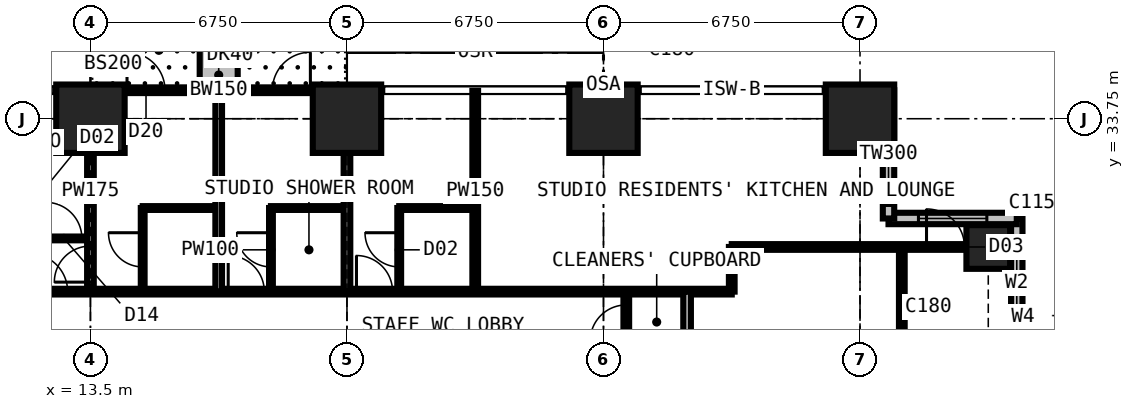
"""IFC4 building model, lengths in metres.
Left out: names, types, materials, properties, quantities, classifications, styles, units other than length and angle.
Written with IfcOpenShell. Run it as: python <this file> out.ifc"""

import sys

from ifc_helpers import new_model, si_unit, direction, frame, frame_2d, origin, origin_2d, place, context, subcontext, project, spatial, rectangle, extrude, element, fill, save


model = new_model("IFC4")
c1 = context("Model", 3, precision=1e-05, world=origin(), true_north=direction((0.0, 1.0)))
c2 = subcontext(c1, "Body", "Model", "MODEL_VIEW")
j1 = project(units=[si_unit("LENGTHUNIT", "METRE"), si_unit("PLANEANGLEUNIT", "RADIAN")], contexts=[c1])
p1 = place(None, origin())
s1 = spatial("IfcSite", under=j1, at=p1, CompositionType="ELEMENT")
p2 = place(p1, origin())
s2 = spatial("IfcBuilding", under=s1, at=p2, CompositionType="ELEMENT")
p3 = place(p2, frame((0.0, 0.0, 101.7)))
s3 = spatial("IfcBuildingStorey", under=s2, at=p3, CompositionType="ELEMENT", Elevation=101.7)
for number, where, z_axis, x_axis in (
    (1, (13.5, 33.75, 0.0), (0.0, 0.0, 1.0), (1.0, 0.0, 0.0)),
    (2, (20.25, 33.75, 0.0), (0.0, 0.0, 1.0), (1.0, 0.0, 0.0)),
    (3, (27.0, 33.75, 0.0), (0.0, 0.0, 1.0), (1.0, 0.0, 0.0)),
    (4, (33.75, 33.75, 0.0), (0.0, 0.0, 1.0), (1.0, 0.0, 0.0)),
):
    element("IfcColumn", number, at=place(p3, frame(where, z_axis=z_axis, x_axis=x_axis)), inside=s3, PredefinedType="COLUMN", context=c2, shape_type="SweptSolid", body=[
        extrude(rectangle(XDim=1.8, YDim=1.8, at=origin_2d()), origin(), (0.0, 0.0, 1.0), 3.6),
    ])
p4 = place(p3, frame((37.125, 30.375, 0.0), z_axis=(0.0, 0.0, 1.0), x_axis=(1.0, 0.0, 0.0)))
e5 = element("IfcColumn", 5, at=p4, inside=s3, PredefinedType="COLUMN", context=c2, shape_type="SweptSolid", body=[
    extrude(rectangle(XDim=1.15, YDim=1.15, at=origin_2d()), origin(), (0.0, 0.0, 1.0), 3.6),
])
p5 = place(p3, frame((37.875, 27.75, 0.0), z_axis=(0.0, 0.0, 1.0), x_axis=(0.0, 1.0, 0.0)))
e6 = element("IfcWall", 6, at=p5, inside=s3, PredefinedType="SOLIDWALL", context=c2, shape_type="SweptSolid", body=[
    extrude(rectangle(XDim=3.375, YDim=0.3, at=frame_2d((1.688, 0.0))), origin(), (0.0, 0.0, 1.0), 3.375),
])
p6 = place(p5, frame((0.788, 0.0, 0.6)))
e7 = element("IfcOpeningElement", 7, at=p6, cuts=e6, PredefinedType="OPENING", context=c2, shape_type="SweptSolid", body=[
    extrude(rectangle(XDim=1.8, YDim=2.1, at=frame_2d((0.9, 1.05))), frame((0.0, 0.16, 0.0), z_axis=(0.0, -1.0, 0.0), x_axis=(1.0, 0.0, 0.0)), (0.0, 0.0, 1.0), 0.32),
])
p7 = place(p3, frame((37.875, 31.125, 0.0), z_axis=(0.0, 0.0, 1.0), x_axis=(-1.0, 0.0, 0.0)))
e8 = element("IfcWall", 8, at=p7, inside=s3, PredefinedType="SOLIDWALL", context=c2, shape_type="SweptSolid", body=[
    extrude(rectangle(XDim=3.375, YDim=0.3, at=frame_2d((1.688, 0.0))), origin(), (0.0, 0.0, 1.0), 3.375),
])
p8 = place(p7, frame((0.788, 0.0, 0.6)))
e9 = element("IfcOpeningElement", 9, at=p8, cuts=e8, PredefinedType="OPENING", context=c2, shape_type="SweptSolid", body=[
    extrude(rectangle(XDim=1.8, YDim=2.1, at=frame_2d((0.9, 1.05))), frame((0.0, 0.16, 0.0), z_axis=(0.0, -1.0, 0.0), x_axis=(1.0, 0.0, 0.0)), (0.0, 0.0, 1.0), 0.32),
])
p9 = place(p3, frame((34.5, 31.125, 0.0), z_axis=(0.0, 0.0, 1.0), x_axis=(0.0, 1.0, 0.0)))
e10 = element("IfcWall", 10, at=p9, inside=s3, PredefinedType="SOLIDWALL", context=c2, shape_type="SweptSolid", body=[
    extrude(rectangle(XDim=3.375, YDim=0.3, at=frame_2d((1.688, 0.0))), origin(), (0.0, 0.0, 1.0), 3.375),
])
p10 = place(p9, frame((0.343, 0.0, 0.9)))
e11 = element("IfcOpeningElement", 11, at=p10, cuts=e10, PredefinedType="OPENING", context=c2, shape_type="SweptSolid", body=[
    extrude(rectangle(XDim=1.2, YDim=1.8, at=frame_2d((0.6, 0.9))), frame((0.0, 0.16, 0.0), z_axis=(0.0, -1.0, 0.0), x_axis=(1.0, 0.0, 0.0)), (0.0, 0.0, 1.0), 0.32),
])
p11 = place(p3, frame((13.5, 34.5, 0.0), z_axis=(0.0, 0.0, 1.0), x_axis=(1.0, 0.0, 0.0)))
e12 = element("IfcWall", 12, at=p11, inside=s3, PredefinedType="SOLIDWALL", context=c2, shape_type="SweptSolid", body=[
    extrude(rectangle(XDim=6.75, YDim=0.15, at=frame_2d((3.375, 0.0))), origin(), (0.0, 0.0, 1.0), 3.375),
])
p12 = place(p11, frame((0.962, 0.0, 0.0)))
e13 = element("IfcOpeningElement", 13, at=p12, cuts=e12, PredefinedType="OPENING", context=c2, shape_type="SweptSolid", body=[
    extrude(rectangle(XDim=1.0, YDim=2.2, at=frame_2d((0.5, 1.1))), frame((0.0, 0.085, 0.0), z_axis=(0.0, -1.0, 0.0), x_axis=(1.0, 0.0, 0.0)), (0.0, 0.0, 1.0), 0.17),
])
p13 = place(p11, frame((2.025, 0.0, 0.9)))
e14 = element("IfcOpeningElement", 14, at=p13, cuts=e12, PredefinedType="OPENING", context=c2, shape_type="SweptSolid", body=[
    extrude(rectangle(XDim=1.2, YDim=1.8, at=frame_2d((0.6, 0.9))), frame((0.0, 0.085, 0.0), z_axis=(0.0, -1.0, 0.0), x_axis=(1.0, 0.0, 0.0)), (0.0, 0.0, 1.0), 0.17),
])
p14 = place(p11, frame((4.788, 0.0, 0.0)))
e15 = element("IfcOpeningElement", 15, at=p14, cuts=e12, PredefinedType="OPENING", context=c2, shape_type="SweptSolid", body=[
    extrude(rectangle(XDim=1.0, YDim=2.2, at=frame_2d((0.5, 1.1))), frame((0.0, 0.085, 0.0), z_axis=(0.0, -1.0, 0.0), x_axis=(1.0, 0.0, 0.0)), (0.0, 0.0, 1.0), 0.17),
])
p15 = place(p11, frame((3.525, 0.0, 0.9)))
e16 = element("IfcOpeningElement", 16, at=p15, cuts=e12, PredefinedType="OPENING", context=c2, shape_type="SweptSolid", body=[
    extrude(rectangle(XDim=1.2, YDim=1.8, at=frame_2d((0.6, 0.9))), frame((0.0, 0.085, 0.0), z_axis=(0.0, -1.0, 0.0), x_axis=(1.0, 0.0, 0.0)), (0.0, 0.0, 1.0), 0.17),
])
p16 = place(p3, frame((16.875, 34.6, 0.0), z_axis=(0.0, 0.0, 1.0), x_axis=(0.0, 1.0, 0.0)))
e17 = element("IfcWall", 17, at=p16, inside=s3, PredefinedType="USERDEFINED", context=c2, shape_type="SweptSolid", body=[
    extrude(rectangle(XDim=2.2, YDim=1.0, at=frame_2d((1.1, 0.0))), origin(), (0.0, 0.0, 1.0), 0.9),
])
p17 = place(p3, frame((10.125, 30.6, 0.0), z_axis=(0.0, 0.0, 1.0), x_axis=(1.0, 0.0, 0.0)))
e18 = element("IfcWall", 18, at=p17, inside=s3, PredefinedType="PARTITIONING", context=c2, shape_type="SweptSolid", body=[
    extrude(rectangle(XDim=3.375, YDim=0.1, at=frame_2d((1.688, 0.0))), origin(), (0.0, 0.0, 1.0), 3.375),
])
p18 = place(p17, frame((2.2, 0.0, 0.0)))
e19 = element("IfcOpeningElement", 19, at=p18, cuts=e18, PredefinedType="OPENING", context=c2, shape_type="SweptSolid", body=[
    extrude(rectangle(XDim=0.95, YDim=2.2, at=frame_2d((0.475, 1.1))), frame((0.0, 0.06, 0.0), z_axis=(0.0, -1.0, 0.0), x_axis=(1.0, 0.0, 0.0)), (0.0, 0.0, 1.0), 0.12),
])
p19 = place(p3, frame((11.3, 29.2, 0.0), z_axis=(0.0, 0.0, 1.0), x_axis=(1.0, 0.0, 0.0)))
e20 = element("IfcWall", 20, at=p19, inside=s3, PredefinedType="PARTITIONING", context=c2, shape_type="SweptSolid", body=[
    extrude(rectangle(XDim=19.075, YDim=0.15, at=frame_2d((9.538, 0.0))), origin(), (0.0, 0.0, 1.0), 3.375),
])
p20 = place(p19, frame((5.825, 0.0, 0.0)))
e21 = element("IfcOpeningElement", 21, at=p20, cuts=e20, PredefinedType="OPENING", context=c2, shape_type="SweptSolid", body=[
    extrude(rectangle(XDim=0.95, YDim=2.2, at=frame_2d((0.475, 1.1))), frame((0.0, 0.085, 0.0), z_axis=(0.0, -1.0, 0.0), x_axis=(1.0, 0.0, 0.0)), (0.0, 0.0, 1.0), 0.17),
])
p21 = place(p19, frame((9.2, 0.0, 0.0)))
e22 = element("IfcOpeningElement", 22, at=p21, cuts=e20, PredefinedType="OPENING", context=c2, shape_type="SweptSolid", body=[
    extrude(rectangle(XDim=0.95, YDim=2.2, at=frame_2d((0.475, 1.1))), frame((0.0, 0.085, 0.0), z_axis=(0.0, -1.0, 0.0), x_axis=(1.0, 0.0, 0.0)), (0.0, 0.0, 1.0), 0.17),
])
p22 = place(p19, frame((0.6, 0.0, 0.0)))
e23 = element("IfcOpeningElement", 23, at=p22, cuts=e20, PredefinedType="OPENING", context=c2, shape_type="SweptSolid", body=[
    extrude(rectangle(XDim=1.0, YDim=2.2, at=frame_2d((0.5, 1.1))), frame((0.0, 0.085, 0.0), z_axis=(0.0, -1.0, 0.0), x_axis=(1.0, 0.0, 0.0)), (0.0, 0.0, 1.0), 0.17),
])
p23 = place(p3, frame((13.5, 29.2, 0.0), z_axis=(0.0, 0.0, 1.0), x_axis=(0.0, 1.0, 0.0)))
e24 = element("IfcWall", 24, at=p23, inside=s3, PredefinedType="PARTITIONING", context=c2, shape_type="SweptSolid", body=[
    extrude(rectangle(XDim=5.284, YDim=0.175, at=frame_2d((2.642, 0.0))), origin(), (0.0, 0.0, 1.0), 2.806),
])
p24 = place(p23, frame((0.25, 0.0, 0.0)))
e25 = element("IfcOpeningElement", 25, at=p24, cuts=e24, PredefinedType="OPENING", context=c2, shape_type="SweptSolid", body=[
    extrude(rectangle(XDim=0.95, YDim=2.2, at=frame_2d((0.475, 1.1))), frame((0.0, 0.097, 0.0), z_axis=(0.0, -1.0, 0.0), x_axis=(1.0, 0.0, 0.0)), (0.0, 0.0, 1.0), 0.195),
])
p25 = place(p3, frame((14.875, 29.2, 0.0), z_axis=(0.0, 0.0, 1.0), x_axis=(0.0, 1.0, 0.0)))
e26 = element("IfcWall", 26, at=p25, inside=s3, PredefinedType="PARTITIONING", context=c2, shape_type="SweptSolid", body=[
    extrude(rectangle(XDim=2.2, YDim=0.1, at=frame_2d((1.1, 0.0))), origin(), (0.0, 0.0, 1.0), 3.375),
])
p26 = place(p25, frame((0.65, 0.0, 0.0)))
e27 = element("IfcOpeningElement", 27, at=p26, cuts=e26, PredefinedType="OPENING", context=c2, shape_type="SweptSolid", body=[
    extrude(rectangle(XDim=0.9, YDim=2.2, at=frame_2d((0.45, 1.1))), frame((0.0, 0.06, 0.0), z_axis=(0.0, -1.0, 0.0), x_axis=(1.0, 0.0, 0.0)), (0.0, 0.0, 1.0), 0.12),
])
p27 = place(p3, frame((14.875, 31.4, 0.0), z_axis=(0.0, 0.0, 1.0), x_axis=(1.0, 0.0, 0.0)))
e28 = element("IfcWall", 28, at=p27, inside=s3, PredefinedType="PARTITIONING", context=c2, shape_type="SweptSolid", body=[
    extrude(rectangle(XDim=2.0, YDim=0.1, at=frame_2d((1.0, 0.0))), origin(), (0.0, 0.0, 1.0), 3.375),
])
p28 = place(p3, frame((16.875, 29.2, 0.0), z_axis=(0.0, 0.0, 1.0), x_axis=(0.0, 1.0, 0.0)))
e29 = element("IfcWall", 29, at=p28, inside=s3, PredefinedType="PARTITIONING", context=c2, shape_type="SweptSolid", body=[
    extrude(rectangle(XDim=5.284, YDim=0.175, at=frame_2d((2.642, 0.0))), origin(), (0.0, 0.0, 1.0), 3.375),
])
p29 = place(p3, frame((18.25, 29.2, 0.0), z_axis=(0.0, 0.0, 1.0), x_axis=(0.0, 1.0, 0.0)))
e30 = element("IfcWall", 30, at=p29, inside=s3, PredefinedType="PARTITIONING", context=c2, shape_type="SweptSolid", body=[
    extrude(rectangle(XDim=2.2, YDim=0.1, at=frame_2d((1.1, 0.0))), origin(), (0.0, 0.0, 1.0), 3.375),
])
p30 = place(p29, frame((0.65, 0.0, 0.0)))
e31 = element("IfcOpeningElement", 31, at=p30, cuts=e30, PredefinedType="OPENING", context=c2, shape_type="SweptSolid", body=[
    extrude(rectangle(XDim=0.9, YDim=2.2, at=frame_2d((0.45, 1.1))), frame((0.0, 0.06, 0.0), z_axis=(0.0, -1.0, 0.0), x_axis=(1.0, 0.0, 0.0)), (0.0, 0.0, 1.0), 0.12),
])
p31 = place(p3, frame((18.25, 31.4, 0.0), z_axis=(0.0, 0.0, 1.0), x_axis=(1.0, 0.0, 0.0)))
e32 = element("IfcWall", 32, at=p31, inside=s3, PredefinedType="PARTITIONING", context=c2, shape_type="SweptSolid", body=[
    extrude(rectangle(XDim=2.0, YDim=0.1, at=frame_2d((1.0, 0.0))), origin(), (0.0, 0.0, 1.0), 3.375),
])
p32 = place(p3, frame((20.25, 29.2, 0.0), z_axis=(0.0, 0.0, 1.0), x_axis=(0.0, 1.0, 0.0)))
e33 = element("IfcWall", 33, at=p32, inside=s3, PredefinedType="PARTITIONING", context=c2, shape_type="SweptSolid", body=[
    extrude(rectangle(XDim=5.284, YDim=0.175, at=frame_2d((2.642, 0.0))), origin(), (0.0, 0.0, 1.0), 2.61),
])
p33 = place(p3, frame((21.625, 29.2, 0.0), z_axis=(0.0, 0.0, 1.0), x_axis=(0.0, 1.0, 0.0)))
e34 = element("IfcWall", 34, at=p33, inside=s3, PredefinedType="PARTITIONING", context=c2, shape_type="SweptSolid", body=[
    extrude(rectangle(XDim=2.2, YDim=0.1, at=frame_2d((1.1, 0.0))), origin(), (0.0, 0.0, 1.0), 3.375),
])
p34 = place(p33, frame((0.65, 0.0, 0.0)))
e35 = element("IfcOpeningElement", 35, at=p34, cuts=e34, PredefinedType="OPENING", context=c2, shape_type="SweptSolid", body=[
    extrude(rectangle(XDim=0.9, YDim=2.2, at=frame_2d((0.45, 1.1))), frame((0.0, 0.06, 0.0), z_axis=(0.0, -1.0, 0.0), x_axis=(1.0, 0.0, 0.0)), (0.0, 0.0, 1.0), 0.12),
])
p35 = place(p3, frame((21.625, 31.4, 0.0), z_axis=(0.0, 0.0, 1.0), x_axis=(1.0, 0.0, 0.0)))
e36 = element("IfcWall", 36, at=p35, inside=s3, PredefinedType="PARTITIONING", context=c2, shape_type="SweptSolid", body=[
    extrude(rectangle(XDim=2.0, YDim=0.1, at=frame_2d((1.0, 0.0))), origin(), (0.0, 0.0, 1.0), 3.375),
])
p36 = place(p3, frame((23.625, 29.2, 0.0), z_axis=(0.0, 0.0, 1.0), x_axis=(0.0, 1.0, 0.0)))
e37 = element("IfcWall", 37, at=p36, inside=s3, PredefinedType="PARTITIONING", context=c2, shape_type="SweptSolid", body=[
    extrude(rectangle(XDim=5.284, YDim=0.15, at=frame_2d((2.642, 0.0))), origin(), (0.0, 0.0, 1.0), 3.375),
])
p37 = place(p3, frame((27.6, 27.6, 0.0), z_axis=(0.0, 0.0, 1.0), x_axis=(0.0, 1.0, 0.0)))
e38 = element("IfcWall", 38, at=p37, inside=s3, PredefinedType="PARTITIONING", context=c2, shape_type="SweptSolid", body=[
    extrude(rectangle(XDim=1.6, YDim=0.15, at=frame_2d((0.8, 0.0))), origin(), (0.0, 0.0, 1.0), 3.375),
])
p38 = place(p37, frame((0.3, 0.0, 0.0)))
e39 = element("IfcOpeningElement", 39, at=p38, cuts=e38, PredefinedType="OPENING", context=c2, shape_type="SweptSolid", body=[
    extrude(rectangle(XDim=0.95, YDim=2.2, at=frame_2d((0.475, 1.1))), frame((0.0, 0.085, 0.0), z_axis=(0.0, -1.0, 0.0), x_axis=(1.0, 0.0, 0.0)), (0.0, 0.0, 1.0), 0.17),
])
p39 = place(p3, frame((29.2, 11.3, 0.0), z_axis=(0.0, 0.0, 1.0), x_axis=(0.0, 1.0, 0.0)))
e40 = element("IfcWall", 40, at=p39, inside=s3, PredefinedType="PARTITIONING", context=c2, shape_type="SweptSolid", body=[
    extrude(rectangle(XDim=17.9, YDim=0.2, at=frame_2d((8.95, 0.0))), origin(), (0.0, 0.0, 1.0), 3.375),
])
p40 = place(p39, frame((8.35, 0.0, 0.0)))
e41 = element("IfcOpeningElement", 41, at=p40, cuts=e40, PredefinedType="OPENING", context=c2, shape_type="SweptSolid", body=[
    extrude(rectangle(XDim=1.2, YDim=2.2, at=frame_2d((0.6, 1.1))), frame((0.0, 0.11, 0.0), z_axis=(0.0, -1.0, 0.0), x_axis=(1.0, 0.0, 0.0)), (0.0, 0.0, 1.0), 0.22),
])
p41 = place(p3, frame((30.375, 29.2, 0.0), z_axis=(0.0, 0.0, 1.0), x_axis=(0.0, 1.0, 0.0)))
e42 = element("IfcWall", 42, at=p41, inside=s3, PredefinedType="PARTITIONING", context=c2, shape_type="SweptSolid", body=[
    extrude(rectangle(XDim=1.175, YDim=0.15, at=frame_2d((0.587, 0.0))), origin(), (0.0, 0.0, 1.0), 3.375),
])
p42 = place(p3, frame((30.375, 30.375, 0.0), z_axis=(0.0, 0.0, 1.0), x_axis=(1.0, 0.0, 0.0)))
e43 = element("IfcWall", 43, at=p42, inside=s3, PredefinedType="PARTITIONING", context=c2, shape_type="SweptSolid", body=[
    extrude(rectangle(XDim=7.35, YDim=0.15, at=frame_2d((3.675, 0.0))), origin(), (0.0, 0.0, 1.0), 2.877),
])
p43 = place(p42, frame((5.125, 0.0, 0.0)))
e44 = element("IfcOpeningElement", 44, at=p43, cuts=e43, PredefinedType="OPENING", context=c2, shape_type="SweptSolid", body=[
    extrude(rectangle(XDim=1.0, YDim=2.2, at=frame_2d((0.5, 1.1))), frame((0.0, 0.085, 0.0), z_axis=(0.0, -1.0, 0.0), x_axis=(1.0, 0.0, 0.0)), (0.0, 0.0, 1.0), 0.17),
])
p44 = place(p3, frame((34.85, 12.55, 0.0), z_axis=(0.0, 0.0, 1.0), x_axis=(0.0, 1.0, 0.0)))
e45 = element("IfcWall", 45, at=p44, inside=s3, PredefinedType="PARTITIONING", context=c2, shape_type="SweptSolid", body=[
    extrude(rectangle(XDim=17.825, YDim=0.15, at=frame_2d((8.913, 0.0))), origin(), (0.0, 0.0, 1.0), 3.375),
])
p45 = place(p44, frame((8.6, 0.0, 0.0)))
e46 = element("IfcOpeningElement", 46, at=p45, cuts=e45, PredefinedType="OPENING", context=c2, shape_type="SweptSolid", body=[
    extrude(rectangle(XDim=0.95, YDim=2.2, at=frame_2d((0.475, 1.1))), frame((0.0, 0.085, 0.0), z_axis=(0.0, -1.0, 0.0), x_axis=(1.0, 0.0, 0.0)), (0.0, 0.0, 1.0), 0.17),
])
p46 = place(p6, origin())
e47 = element("IfcWindow", 47, at=p46, inside=s3, PartitioningType="SINGLE_PANEL", PredefinedType="WINDOW", context=c2, shape_type="SweptSolid", body=[
    extrude(rectangle(XDim=1.8, YDim=2.1, at=frame_2d((0.9, 1.05))), frame((0.0, 0.03, 0.0), z_axis=(0.0, -1.0, 0.0), x_axis=(1.0, 0.0, 0.0)), (0.0, 0.0, 1.0), 0.06),
])
fill(e7, e47)
p47 = place(p8, origin())
e48 = element("IfcWindow", 48, at=p47, inside=s3, PartitioningType="SINGLE_PANEL", PredefinedType="WINDOW", context=c2, shape_type="SweptSolid", body=[
    extrude(rectangle(XDim=1.8, YDim=2.1, at=frame_2d((0.9, 1.05))), frame((0.0, 0.03, 0.0), z_axis=(0.0, -1.0, 0.0), x_axis=(1.0, 0.0, 0.0)), (0.0, 0.0, 1.0), 0.06),
])
fill(e9, e48)
p48 = place(p10, origin())
e49 = element("IfcWindow", 49, at=p48, inside=s3, PartitioningType="SINGLE_PANEL", PredefinedType="WINDOW", context=c2, shape_type="SweptSolid", body=[
    extrude(rectangle(XDim=1.2, YDim=1.8, at=frame_2d((0.6, 0.9))), frame((0.0, 0.03, 0.0), z_axis=(0.0, -1.0, 0.0), x_axis=(1.0, 0.0, 0.0)), (0.0, 0.0, 1.0), 0.06),
])
fill(e11, e49)
p49 = place(p12, origin())
e50 = element("IfcDoor", 50, at=p49, inside=s3, OperationType="SINGLE_SWING_LEFT", PredefinedType="DOOR", context=c2, shape_type="SweptSolid", body=[
    extrude(rectangle(XDim=1.0, YDim=2.2, at=frame_2d((0.5, 1.1))), frame((0.0, 0.025, 0.0), z_axis=(0.0, -1.0, 0.0), x_axis=(1.0, 0.0, 0.0)), (0.0, 0.0, 1.0), 0.05),
])
fill(e13, e50)
p50 = place(p13, origin())
e51 = element("IfcWindow", 51, at=p50, inside=s3, PartitioningType="SINGLE_PANEL", PredefinedType="WINDOW", context=c2, shape_type="SweptSolid", body=[
    extrude(rectangle(XDim=1.2, YDim=1.8, at=frame_2d((0.6, 0.9))), frame((0.0, 0.03, 0.0), z_axis=(0.0, -1.0, 0.0), x_axis=(1.0, 0.0, 0.0)), (0.0, 0.0, 1.0), 0.06),
])
fill(e14, e51)
p51 = place(p14, origin())
e52 = element("IfcDoor", 52, at=p51, inside=s3, OperationType="SINGLE_SWING_RIGHT", PredefinedType="DOOR", context=c2, shape_type="SweptSolid", body=[
    extrude(rectangle(XDim=1.0, YDim=2.2, at=frame_2d((0.5, 1.1))), frame((0.0, 0.025, 0.0), z_axis=(0.0, -1.0, 0.0), x_axis=(1.0, 0.0, 0.0)), (0.0, 0.0, 1.0), 0.05),
])
fill(e15, e52)
p52 = place(p15, origin())
e53 = element("IfcWindow", 53, at=p52, inside=s3, PartitioningType="SINGLE_PANEL", PredefinedType="WINDOW", context=c2, shape_type="SweptSolid", body=[
    extrude(rectangle(XDim=1.2, YDim=1.8, at=frame_2d((0.6, 0.9))), frame((0.0, 0.03, 0.0), z_axis=(0.0, -1.0, 0.0), x_axis=(1.0, 0.0, 0.0)), (0.0, 0.0, 1.0), 0.06),
])
fill(e16, e53)
p53 = place(p38, origin())
e54 = element("IfcDoor", 54, at=p53, inside=s3, OperationType="SINGLE_SWING_LEFT", PredefinedType="DOOR", context=c2, shape_type="SweptSolid", body=[
    extrude(rectangle(XDim=0.95, YDim=2.2, at=frame_2d((0.475, 1.1))), frame((0.0, 0.025, 0.0), z_axis=(0.0, -1.0, 0.0), x_axis=(1.0, 0.0, 0.0)), (0.0, 0.0, 1.0), 0.05),
])
fill(e39, e54)
p54 = place(p43, origin())
e55 = element("IfcDoor", 55, at=p54, inside=s3, OperationType="SINGLE_SWING_LEFT", PredefinedType="DOOR", context=c2, shape_type="SweptSolid", body=[
    extrude(rectangle(XDim=1.0, YDim=2.2, at=frame_2d((0.5, 1.1))), frame((0.0, 0.025, 0.0), z_axis=(0.0, -1.0, 0.0), x_axis=(1.0, 0.0, 0.0)), (0.0, 0.0, 1.0), 0.05),
])
fill(e44, e55)
p55 = place(p18, origin())
e56 = element("IfcDoor", 56, at=p55, inside=s3, OperationType="SINGLE_SWING_LEFT", PredefinedType="DOOR", context=c2, shape_type="SweptSolid", body=[
    extrude(rectangle(XDim=0.95, YDim=2.2, at=frame_2d((0.475, 1.1))), frame((0.0, 0.025, 0.0), z_axis=(0.0, -1.0, 0.0), x_axis=(1.0, 0.0, 0.0)), (0.0, 0.0, 1.0), 0.05),
])
fill(e19, e56)
p56 = place(p24, origin())
e57 = element("IfcDoor", 57, at=p56, inside=s3, OperationType="SINGLE_SWING_LEFT", PredefinedType="DOOR", context=c2, shape_type="SweptSolid", body=[
    extrude(rectangle(XDim=0.95, YDim=2.2, at=frame_2d((0.475, 1.1))), frame((0.0, 0.025, 0.0), z_axis=(0.0, -1.0, 0.0), x_axis=(1.0, 0.0, 0.0)), (0.0, 0.0, 1.0), 0.05),
])
fill(e25, e57)
p57 = place(p26, origin())
e58 = element("IfcDoor", 58, at=p57, inside=s3, OperationType="SINGLE_SWING_RIGHT", PredefinedType="DOOR", context=c2, shape_type="SweptSolid", body=[
    extrude(rectangle(XDim=0.9, YDim=2.2, at=frame_2d((0.45, 1.1))), frame((0.0, 0.025, 0.0), z_axis=(0.0, -1.0, 0.0), x_axis=(1.0, 0.0, 0.0)), (0.0, 0.0, 1.0), 0.05),
])
fill(e27, e58)
p58 = place(p20, origin())
e59 = element("IfcDoor", 59, at=p58, inside=s3, OperationType="SINGLE_SWING_LEFT", PredefinedType="DOOR", context=c2, shape_type="SweptSolid", body=[
    extrude(rectangle(XDim=0.95, YDim=2.2, at=frame_2d((0.475, 1.1))), frame((0.0, 0.025, 0.0), z_axis=(0.0, -1.0, 0.0), x_axis=(1.0, 0.0, 0.0)), (0.0, 0.0, 1.0), 0.05),
])
fill(e21, e59)
p59 = place(p30, origin())
e60 = element("IfcDoor", 60, at=p59, inside=s3, OperationType="SINGLE_SWING_RIGHT", PredefinedType="DOOR", context=c2, shape_type="SweptSolid", body=[
    extrude(rectangle(XDim=0.9, YDim=2.2, at=frame_2d((0.45, 1.1))), frame((0.0, 0.025, 0.0), z_axis=(0.0, -1.0, 0.0), x_axis=(1.0, 0.0, 0.0)), (0.0, 0.0, 1.0), 0.05),
])
fill(e31, e60)
p60 = place(p21, origin())
e61 = element("IfcDoor", 61, at=p60, inside=s3, OperationType="SINGLE_SWING_LEFT", PredefinedType="DOOR", context=c2, shape_type="SweptSolid", body=[
    extrude(rectangle(XDim=0.95, YDim=2.2, at=frame_2d((0.475, 1.1))), frame((0.0, 0.025, 0.0), z_axis=(0.0, -1.0, 0.0), x_axis=(1.0, 0.0, 0.0)), (0.0, 0.0, 1.0), 0.05),
])
fill(e22, e61)
p61 = place(p34, origin())
e62 = element("IfcDoor", 62, at=p61, inside=s3, OperationType="SINGLE_SWING_RIGHT", PredefinedType="DOOR", context=c2, shape_type="SweptSolid", body=[
    extrude(rectangle(XDim=0.9, YDim=2.2, at=frame_2d((0.45, 1.1))), frame((0.0, 0.025, 0.0), z_axis=(0.0, -1.0, 0.0), x_axis=(1.0, 0.0, 0.0)), (0.0, 0.0, 1.0), 0.05),
])
fill(e35, e62)
p62 = place(p22, origin())
e63 = element("IfcDoor", 63, at=p62, inside=s3, OperationType="SINGLE_SWING_LEFT", PredefinedType="DOOR", context=c2, shape_type="SweptSolid", body=[
    extrude(rectangle(XDim=1.0, YDim=2.2, at=frame_2d((0.5, 1.1))), frame((0.0, 0.025, 0.0), z_axis=(0.0, -1.0, 0.0), x_axis=(1.0, 0.0, 0.0)), (0.0, 0.0, 1.0), 0.05),
])
fill(e23, e63)
save(model, sys.argv[1])
